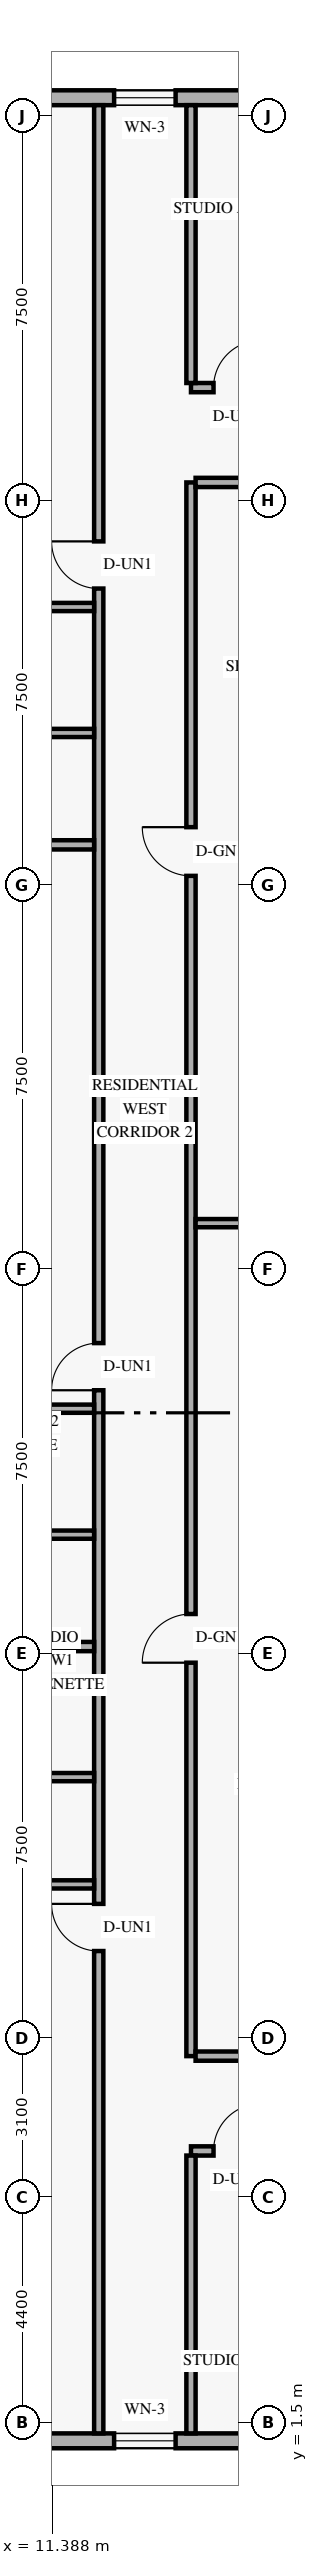
"""IFC4 building model, lengths in metres.
Left out: names, types, materials, properties, quantities, classifications, styles, units other than length and angle.
Written with IfcOpenShell. Run it as: python <this file> out.ifc"""

import sys

from ifc_helpers import new_model, si_unit, direction, frame, frame_2d, origin, place, context, subcontext, project, spatial, rectangle, extrude, element, fill, save


model = new_model("IFC4")
c1 = context("Model", 3, precision=1e-05, world=origin(), true_north=direction((0.0, 1.0)))
c2 = subcontext(c1, "Body", "Model", "MODEL_VIEW")
j1 = project(units=[si_unit("LENGTHUNIT", "METRE"), si_unit("PLANEANGLEUNIT", "RADIAN")], contexts=[c1])
p1 = place(None, origin())
s1 = spatial("IfcSite", under=j1, at=p1, CompositionType="ELEMENT")
p2 = place(p1, origin())
s2 = spatial("IfcBuilding", under=s1, at=p2, CompositionType="ELEMENT")
p3 = place(p2, frame((0.0, 0.0, 67.8)))
s3 = spatial("IfcBuildingStorey", under=s2, at=p3, CompositionType="ELEMENT", Elevation=67.8)
p4 = place(p3, frame((5.42, 1.145, 0.0), z_axis=(0.0, 0.0, 1.0), x_axis=(1.0, 0.0, 0.0)))
e1 = element("IfcWall", 1, at=p4, inside=s3, PredefinedType="SOLIDWALL", context=c2, shape_type="SweptSolid", body=[
    extrude(rectangle(XDim=39.56, YDim=0.29, at=frame_2d((19.78, 0.0))), origin(), (0.0, 0.0, 1.0), 3.3),
])
p5 = place(p4, frame((2.765, 0.0, 0.85)))
e2 = element("IfcOpeningElement", 2, at=p5, cuts=e1, PredefinedType="OPENING", context=c2, shape_type="SweptSolid", body=[
    extrude(rectangle(XDim=1.35, YDim=1.55, at=frame_2d((0.675, 0.775))), frame((0.0, 0.155, 0.0), z_axis=(0.0, -1.0, 0.0), x_axis=(1.0, 0.0, 0.0)), (0.0, 0.0, 1.0), 0.31),
])
p6 = place(p4, frame((7.18, 0.0, 0.85)))
e3 = element("IfcOpeningElement", 3, at=p6, cuts=e1, PredefinedType="OPENING", context=c2, shape_type="SweptSolid", body=[
    extrude(rectangle(XDim=1.2, YDim=1.5, at=frame_2d((0.6, 0.75))), frame((0.0, 0.155, 0.0), z_axis=(0.0, -1.0, 0.0), x_axis=(1.0, 0.0, 0.0)), (0.0, 0.0, 1.0), 0.31),
])
p7 = place(p4, frame((12.056, 0.0, 0.85)))
e4 = element("IfcOpeningElement", 4, at=p7, cuts=e1, PredefinedType="OPENING", context=c2, shape_type="SweptSolid", body=[
    extrude(rectangle(XDim=1.35, YDim=1.55, at=frame_2d((0.675, 0.775))), frame((0.0, 0.155, 0.0), z_axis=(0.0, -1.0, 0.0), x_axis=(1.0, 0.0, 0.0)), (0.0, 0.0, 1.0), 0.31),
])
p8 = place(p4, frame((18.665, 0.0, 0.85)))
e5 = element("IfcOpeningElement", 5, at=p8, cuts=e1, PredefinedType="OPENING", context=c2, shape_type="SweptSolid", body=[
    extrude(rectangle(XDim=1.35, YDim=1.55, at=frame_2d((0.675, 0.775))), frame((0.0, 0.155, 0.0), z_axis=(0.0, -1.0, 0.0), x_axis=(1.0, 0.0, 0.0)), (0.0, 0.0, 1.0), 0.31),
])
p9 = place(p4, frame((25.274, 0.0, 0.85)))
e6 = element("IfcOpeningElement", 6, at=p9, cuts=e1, PredefinedType="OPENING", context=c2, shape_type="SweptSolid", body=[
    extrude(rectangle(XDim=1.35, YDim=1.55, at=frame_2d((0.675, 0.775))), frame((0.0, 0.155, 0.0), z_axis=(0.0, -1.0, 0.0), x_axis=(1.0, 0.0, 0.0)), (0.0, 0.0, 1.0), 0.31),
])
p10 = place(p4, frame((30.39, 0.0, 0.85)))
e7 = element("IfcOpeningElement", 7, at=p10, cuts=e1, PredefinedType="OPENING", context=c2, shape_type="SweptSolid", body=[
    extrude(rectangle(XDim=1.35, YDim=1.55, at=frame_2d((0.675, 0.775))), frame((0.0, 0.155, 0.0), z_axis=(0.0, -1.0, 0.0), x_axis=(1.0, 0.0, 0.0)), (0.0, 0.0, 1.0), 0.31),
])
p11 = place(p4, frame((35.17, 0.0, 0.85)))
e8 = element("IfcOpeningElement", 8, at=p11, cuts=e1, PredefinedType="OPENING", context=c2, shape_type="SweptSolid", body=[
    extrude(rectangle(XDim=1.35, YDim=1.55, at=frame_2d((0.675, 0.775))), frame((0.0, 0.155, 0.0), z_axis=(0.0, -1.0, 0.0), x_axis=(1.0, 0.0, 0.0)), (0.0, 0.0, 1.0), 0.31),
])
p12 = place(p3, frame((44.98, 46.855, 0.0), z_axis=(0.0, 0.0, 1.0), x_axis=(-1.0, 0.0, 0.0)))
e9 = element("IfcWall", 9, at=p12, inside=s3, PredefinedType="SOLIDWALL", context=c2, shape_type="SweptSolid", body=[
    extrude(rectangle(XDim=39.56, YDim=0.29, at=frame_2d((19.78, 0.0))), origin(), (0.0, 0.0, 1.0), 3.3),
])
p13 = place(p12, frame((35.445, 0.0, 0.85)))
e10 = element("IfcOpeningElement", 10, at=p13, cuts=e9, PredefinedType="OPENING", context=c2, shape_type="SweptSolid", body=[
    extrude(rectangle(XDim=1.35, YDim=1.55, at=frame_2d((0.675, 0.775))), frame((0.0, 0.155, 0.0), z_axis=(0.0, -1.0, 0.0), x_axis=(1.0, 0.0, 0.0)), (0.0, 0.0, 1.0), 0.31),
])
p14 = place(p12, frame((31.18, 0.0, 0.85)))
e11 = element("IfcOpeningElement", 11, at=p14, cuts=e9, PredefinedType="OPENING", context=c2, shape_type="SweptSolid", body=[
    extrude(rectangle(XDim=1.2, YDim=1.5, at=frame_2d((0.6, 0.75))), frame((0.0, 0.155, 0.0), z_axis=(0.0, -1.0, 0.0), x_axis=(1.0, 0.0, 0.0)), (0.0, 0.0, 1.0), 0.31),
])
p15 = place(p12, frame((25.834, 0.0, 0.85)))
e12 = element("IfcOpeningElement", 12, at=p15, cuts=e9, PredefinedType="OPENING", context=c2, shape_type="SweptSolid", body=[
    extrude(rectangle(XDim=1.35, YDim=1.55, at=frame_2d((0.675, 0.775))), frame((0.0, 0.155, 0.0), z_axis=(0.0, -1.0, 0.0), x_axis=(1.0, 0.0, 0.0)), (0.0, 0.0, 1.0), 0.31),
])
p16 = place(p12, frame((18.799, 0.0, 0.85)))
e13 = element("IfcOpeningElement", 13, at=p16, cuts=e9, PredefinedType="OPENING", context=c2, shape_type="SweptSolid", body=[
    extrude(rectangle(XDim=1.35, YDim=1.55, at=frame_2d((0.675, 0.775))), frame((0.0, 0.155, 0.0), z_axis=(0.0, -1.0, 0.0), x_axis=(1.0, 0.0, 0.0)), (0.0, 0.0, 1.0), 0.31),
])
p17 = place(p12, frame((12.51, 0.0, 0.85)))
e14 = element("IfcOpeningElement", 14, at=p17, cuts=e9, PredefinedType="OPENING", context=c2, shape_type="SweptSolid", body=[
    extrude(rectangle(XDim=1.35, YDim=1.55, at=frame_2d((0.675, 0.775))), frame((0.0, 0.155, 0.0), z_axis=(0.0, -1.0, 0.0), x_axis=(1.0, 0.0, 0.0)), (0.0, 0.0, 1.0), 0.31),
])
p18 = place(p12, frame((7.82, 0.0, 0.85)))
e15 = element("IfcOpeningElement", 15, at=p18, cuts=e9, PredefinedType="OPENING", context=c2, shape_type="SweptSolid", body=[
    extrude(rectangle(XDim=1.35, YDim=1.55, at=frame_2d((0.675, 0.775))), frame((0.0, 0.155, 0.0), z_axis=(0.0, -1.0, 0.0), x_axis=(1.0, 0.0, 0.0)), (0.0, 0.0, 1.0), 0.31),
])
p19 = place(p12, frame((3.04, 0.0, 0.85)))
e16 = element("IfcOpeningElement", 16, at=p19, cuts=e9, PredefinedType="OPENING", context=c2, shape_type="SweptSolid", body=[
    extrude(rectangle(XDim=1.35, YDim=1.55, at=frame_2d((0.675, 0.775))), frame((0.0, 0.155, 0.0), z_axis=(0.0, -1.0, 0.0), x_axis=(1.0, 0.0, 0.0)), (0.0, 0.0, 1.0), 0.31),
])
p20 = place(p3, frame((14.1, 6.8, 0.0), z_axis=(0.0, 0.0, 1.0), x_axis=(1.0, 0.0, 0.0)))
e17 = element("IfcWall", 17, at=p20, inside=s3, PredefinedType="STANDARD", context=c2, shape_type="SweptSolid", body=[
    extrude(rectangle(XDim=21.32, YDim=0.18, at=frame_2d((10.66, 0.0))), origin(), (0.0, 0.0, 1.0), 2.589),
])
p21 = place(p20, frame((0.44, 0.0, 0.0)))
e18 = element("IfcOpeningElement", 18, at=p21, cuts=e17, PredefinedType="OPENING", context=c2, shape_type="SweptSolid", body=[
    extrude(rectangle(XDim=0.92, YDim=2.15, at=frame_2d((0.46, 1.075))), frame((0.0, 0.1, 0.0), z_axis=(0.0, -1.0, 0.0), x_axis=(1.0, 0.0, 0.0)), (0.0, 0.0, 1.0), 0.2),
])
p22 = place(p20, frame((8.582, 0.0, 0.0)))
e19 = element("IfcOpeningElement", 19, at=p22, cuts=e17, PredefinedType="OPENING", context=c2, shape_type="SweptSolid", body=[
    extrude(rectangle(XDim=0.95, YDim=2.15, at=frame_2d((0.475, 1.075))), frame((0.0, 0.1, 0.0), z_axis=(0.0, -1.0, 0.0), x_axis=(1.0, 0.0, 0.0)), (0.0, 0.0, 1.0), 0.2),
])
p23 = place(p20, frame((13.658, 0.0, 0.0)))
e20 = element("IfcOpeningElement", 20, at=p23, cuts=e17, PredefinedType="OPENING", context=c2, shape_type="SweptSolid", body=[
    extrude(rectangle(XDim=0.92, YDim=2.15, at=frame_2d((0.46, 1.075))), frame((0.0, 0.1, 0.0), z_axis=(0.0, -1.0, 0.0), x_axis=(1.0, 0.0, 0.0)), (0.0, 0.0, 1.0), 0.2),
])
p24 = place(p3, frame((14.1, 41.2, 0.0), z_axis=(0.0, 0.0, 1.0), x_axis=(1.0, 0.0, 0.0)))
e21 = element("IfcWall", 21, at=p24, inside=s3, PredefinedType="STANDARD", context=c2, shape_type="SweptSolid", body=[
    extrude(rectangle(XDim=21.32, YDim=0.18, at=frame_2d((10.66, 0.0))), origin(), (0.0, 0.0, 1.0), 2.589),
])
p25 = place(p24, frame((0.44, 0.0, 0.0)))
e22 = element("IfcOpeningElement", 22, at=p25, cuts=e21, PredefinedType="OPENING", context=c2, shape_type="SweptSolid", body=[
    extrude(rectangle(XDim=0.92, YDim=2.15, at=frame_2d((0.46, 1.075))), frame((0.0, 0.1, 0.0), z_axis=(0.0, -1.0, 0.0), x_axis=(1.0, 0.0, 0.0)), (0.0, 0.0, 1.0), 0.2),
])
p26 = place(p24, frame((10.631, 0.0, 0.0)))
e23 = element("IfcOpeningElement", 23, at=p26, cuts=e21, PredefinedType="OPENING", context=c2, shape_type="SweptSolid", body=[
    extrude(rectangle(XDim=0.95, YDim=2.15, at=frame_2d((0.475, 1.075))), frame((0.0, 0.1, 0.0), z_axis=(0.0, -1.0, 0.0), x_axis=(1.0, 0.0, 0.0)), (0.0, 0.0, 1.0), 0.2),
])
p27 = place(p24, frame((14.511, 0.0, 0.0)))
e24 = element("IfcOpeningElement", 24, at=p27, cuts=e21, PredefinedType="OPENING", context=c2, shape_type="SweptSolid", body=[
    extrude(rectangle(XDim=0.92, YDim=2.15, at=frame_2d((0.46, 1.075))), frame((0.0, 0.1, 0.0), z_axis=(0.0, -1.0, 0.0), x_axis=(1.0, 0.0, 0.0)), (0.0, 0.0, 1.0), 0.2),
])
p28 = place(p3, frame((12.3, 1.29, 0.0), z_axis=(0.0, 0.0, 1.0), x_axis=(0.0, 1.0, 0.0)))
e25 = element("IfcWall", 25, at=p28, inside=s3, PredefinedType="STANDARD", context=c2, shape_type="SweptSolid", body=[
    extrude(rectangle(XDim=45.42, YDim=0.18, at=frame_2d((22.71, 0.0))), origin(), (0.0, 0.0, 1.0), 2.589),
])
p29 = place(p28, frame((9.41, 0.0, 0.0)))
e26 = element("IfcOpeningElement", 26, at=p29, cuts=e25, PredefinedType="OPENING", context=c2, shape_type="SweptSolid", body=[
    extrude(rectangle(XDim=0.92, YDim=2.15, at=frame_2d((0.46, 1.075))), frame((0.0, 0.1, 0.0), z_axis=(0.0, -1.0, 0.0), x_axis=(1.0, 0.0, 0.0)), (0.0, 0.0, 1.0), 0.2),
])
p30 = place(p28, frame((20.35, 0.0, 0.0)))
e27 = element("IfcOpeningElement", 27, at=p30, cuts=e25, PredefinedType="OPENING", context=c2, shape_type="SweptSolid", body=[
    extrude(rectangle(XDim=0.92, YDim=2.15, at=frame_2d((0.46, 1.075))), frame((0.0, 0.1, 0.0), z_axis=(0.0, -1.0, 0.0), x_axis=(1.0, 0.0, 0.0)), (0.0, 0.0, 1.0), 0.2),
])
p31 = place(p28, frame((35.99, 0.0, 0.0)))
e28 = element("IfcOpeningElement", 28, at=p31, cuts=e25, PredefinedType="OPENING", context=c2, shape_type="SweptSolid", body=[
    extrude(rectangle(XDim=0.92, YDim=2.15, at=frame_2d((0.46, 1.075))), frame((0.0, 0.1, 0.0), z_axis=(0.0, -1.0, 0.0), x_axis=(1.0, 0.0, 0.0)), (0.0, 0.0, 1.0), 0.2),
])
p32 = place(p3, frame((14.1, 8.65, 0.0), z_axis=(0.0, 0.0, 1.0), x_axis=(0.0, 1.0, 0.0)))
e29 = element("IfcWall", 29, at=p32, inside=s3, PredefinedType="STANDARD", context=c2, shape_type="SweptSolid", body=[
    extrude(rectangle(XDim=30.7, YDim=0.18, at=frame_2d((15.35, 0.0))), origin(), (0.0, 0.0, 1.0), 2.589),
])
p33 = place(p32, frame((7.675, 0.0, 0.0)))
e30 = element("IfcOpeningElement", 30, at=p33, cuts=e29, PredefinedType="OPENING", context=c2, shape_type="SweptSolid", body=[
    extrude(rectangle(XDim=0.95, YDim=2.15, at=frame_2d((0.475, 1.075))), frame((0.0, 0.1, 0.0), z_axis=(0.0, -1.0, 0.0), x_axis=(1.0, 0.0, 0.0)), (0.0, 0.0, 1.0), 0.2),
])
p34 = place(p32, frame((23.025, 0.0, 0.0)))
e31 = element("IfcOpeningElement", 31, at=p34, cuts=e29, PredefinedType="OPENING", context=c2, shape_type="SweptSolid", body=[
    extrude(rectangle(XDim=0.95, YDim=2.15, at=frame_2d((0.475, 1.075))), frame((0.0, 0.1, 0.0), z_axis=(0.0, -1.0, 0.0), x_axis=(1.0, 0.0, 0.0)), (0.0, 0.0, 1.0), 0.2),
])
for number, where, z_axis, x_axis in (
    (32, (14.19, 8.65, 0.0), (0.0, 0.0, 1.0), (1.0, 0.0, 0.0)),
    (33, (14.19, 39.35, 0.0), (0.0, 0.0, 1.0), (1.0, 0.0, 0.0)),
):
    element("IfcWall", number, at=place(p3, frame(where, z_axis=z_axis, x_axis=x_axis)), inside=s3, PredefinedType="STANDARD", context=c2, shape_type="SweptSolid", body=[
        extrude(rectangle(XDim=7.37, YDim=0.18, at=frame_2d((3.685, 0.0))), origin(), (0.0, 0.0, 1.0), 2.589),
    ])
for number, where, z_axis, x_axis in (
    (34, (14.1, 1.29, 0.0), (0.0, 0.0, 1.0), (0.0, 1.0, 0.0)),
    (35, (14.1, 41.29, 0.0), (0.0, 0.0, 1.0), (0.0, 1.0, 0.0)),
):
    element("IfcWall", number, at=place(p3, frame(where, z_axis=z_axis, x_axis=x_axis)), inside=s3, PredefinedType="PARTITIONING", context=c2, shape_type="SweptSolid", body=[
        extrude(rectangle(XDim=5.42, YDim=0.18, at=frame_2d((2.71, 0.0))), origin(), (0.0, 0.0, 1.0), 2.749),
    ])
p35 = place(p3, frame((9.68, 12.0, 0.0), z_axis=(0.0, 0.0, 1.0), x_axis=(1.0, 0.0, 0.0)))
e36 = element("IfcWall", 36, at=p35, inside=s3, PredefinedType="PLUMBINGWALL", context=c2, shape_type="SweptSolid", body=[
    extrude(rectangle(XDim=2.53, YDim=0.16, at=frame_2d((1.265, 0.0))), origin(), (0.0, 0.0, 1.0), 2.589),
])
p36 = place(p3, frame((9.84, 14.093, 0.0), z_axis=(0.0, 0.0, 1.0), x_axis=(1.0, 0.0, 0.0)))
e37 = element("IfcWall", 37, at=p36, inside=s3, PredefinedType="PLUMBINGWALL", context=c2, shape_type="SweptSolid", body=[
    extrude(rectangle(XDim=2.37, YDim=0.16, at=frame_2d((1.185, 0.0))), origin(), (0.0, 0.0, 1.0), 2.589),
])
p37 = place(p3, frame((2.09, 16.64, 0.0), z_axis=(0.0, 0.0, 1.0), x_axis=(1.0, 0.0, 0.0)))
e38 = element("IfcWall", 38, at=p37, inside=s3, PredefinedType="PARTITIONING", context=c2, shape_type="SweptSolid", body=[
    extrude(rectangle(XDim=10.12, YDim=0.18, at=frame_2d((5.06, 0.0))), origin(), (0.0, 0.0, 1.0), 2.589),
])
p38 = place(p3, frame((8.43, 21.28, 0.0), z_axis=(0.0, 0.0, 1.0), x_axis=(1.0, 0.0, 0.0)))
e39 = element("IfcWall", 39, at=p38, inside=s3, PredefinedType="PLUMBINGWALL", context=c2, shape_type="SweptSolid", body=[
    extrude(rectangle(XDim=3.78, YDim=0.16, at=frame_2d((1.89, 0.0))), origin(), (0.0, 0.0, 1.0), 2.589),
])
p39 = place(p3, frame((8.59, 18.823, 0.0), z_axis=(0.0, 0.0, 1.0), x_axis=(1.0, 0.0, 0.0)))
e40 = element("IfcWall", 40, at=p39, inside=s3, PredefinedType="PLUMBINGWALL", context=c2, shape_type="SweptSolid", body=[
    extrude(rectangle(XDim=3.62, YDim=0.16, at=frame_2d((1.81, 0.0))), origin(), (0.0, 0.0, 1.0), 2.589),
])
p40 = place(p3, frame((2.09, 32.28, 0.0), z_axis=(0.0, 0.0, 1.0), x_axis=(1.0, 0.0, 0.0)))
e41 = element("IfcWall", 41, at=p40, inside=s3, PredefinedType="PARTITIONING", context=c2, shape_type="SweptSolid", body=[
    extrude(rectangle(XDim=10.12, YDim=0.18, at=frame_2d((5.06, 0.0))), origin(), (0.0, 0.0, 1.0), 2.589),
])
p41 = place(p3, frame((9.528, 36.92, 0.0), z_axis=(0.0, 0.0, 1.0), x_axis=(1.0, 0.0, 0.0)))
e42 = element("IfcWall", 42, at=p41, inside=s3, PredefinedType="PLUMBINGWALL", context=c2, shape_type="SweptSolid", body=[
    extrude(rectangle(XDim=2.682, YDim=0.16, at=frame_2d((1.341, 0.0))), origin(), (0.0, 0.0, 1.0), 2.589),
])
p42 = place(p3, frame((9.688, 34.463, 0.0), z_axis=(0.0, 0.0, 1.0), x_axis=(1.0, 0.0, 0.0)))
e43 = element("IfcWall", 43, at=p42, inside=s3, PredefinedType="PLUMBINGWALL", context=c2, shape_type="SweptSolid", body=[
    extrude(rectangle(XDim=2.522, YDim=0.16, at=frame_2d((1.261, 0.0))), origin(), (0.0, 0.0, 1.0), 2.589),
])
p43 = place(p3, frame((14.19, 24.9, 0.0), z_axis=(0.0, 0.0, 1.0), x_axis=(1.0, 0.0, 0.0)))
e44 = element("IfcWall", 44, at=p43, inside=s3, PredefinedType="PARTITIONING", context=c2, shape_type="SweptSolid", body=[
    extrude(rectangle(XDim=7.37, YDim=0.16, at=frame_2d((3.685, 0.0))), origin(), (0.0, 0.0, 1.0), 2.589),
])
p44 = place(p6, origin())
e45 = element("IfcWindow", 45, at=p44, inside=s3, PartitioningType="SINGLE_PANEL", PredefinedType="WINDOW", context=c2, shape_type="SweptSolid", body=[
    extrude(rectangle(XDim=1.2, YDim=1.5, at=frame_2d((0.6, 0.75))), frame((0.0, 0.03, 0.0), z_axis=(0.0, -1.0, 0.0), x_axis=(1.0, 0.0, 0.0)), (0.0, 0.0, 1.0), 0.06),
])
fill(e3, e45)
p45 = place(p14, origin())
e46 = element("IfcWindow", 46, at=p45, inside=s3, PartitioningType="SINGLE_PANEL", PredefinedType="WINDOW", context=c2, shape_type="SweptSolid", body=[
    extrude(rectangle(XDim=1.2, YDim=1.5, at=frame_2d((0.6, 0.75))), frame((0.0, 0.03, 0.0), z_axis=(0.0, -1.0, 0.0), x_axis=(1.0, 0.0, 0.0)), (0.0, 0.0, 1.0), 0.06),
])
fill(e11, e46)
p46 = place(p29, origin())
e47 = element("IfcDoor", 47, at=p46, inside=s3, OperationType="SINGLE_SWING_RIGHT", PredefinedType="DOOR", context=c2, shape_type="SweptSolid", body=[
    extrude(rectangle(XDim=0.92, YDim=2.15, at=frame_2d((0.46, 1.075))), frame((0.0, 0.025, 0.0), z_axis=(0.0, -1.0, 0.0), x_axis=(1.0, 0.0, 0.0)), (0.0, 0.0, 1.0), 0.05),
])
fill(e26, e47)
p47 = place(p30, origin())
e48 = element("IfcDoor", 48, at=p47, inside=s3, OperationType="SINGLE_SWING_LEFT", PredefinedType="DOOR", context=c2, shape_type="SweptSolid", body=[
    extrude(rectangle(XDim=0.92, YDim=2.15, at=frame_2d((0.46, 1.075))), frame((0.0, 0.025, 0.0), z_axis=(0.0, -1.0, 0.0), x_axis=(1.0, 0.0, 0.0)), (0.0, 0.0, 1.0), 0.05),
])
fill(e27, e48)
p48 = place(p31, origin())
e49 = element("IfcDoor", 49, at=p48, inside=s3, OperationType="SINGLE_SWING_RIGHT", PredefinedType="DOOR", context=c2, shape_type="SweptSolid", body=[
    extrude(rectangle(XDim=0.92, YDim=2.15, at=frame_2d((0.46, 1.075))), frame((0.0, 0.025, 0.0), z_axis=(0.0, -1.0, 0.0), x_axis=(1.0, 0.0, 0.0)), (0.0, 0.0, 1.0), 0.05),
])
fill(e28, e49)
p49 = place(p33, origin())
e50 = element("IfcDoor", 50, at=p49, inside=s3, OperationType="SINGLE_SWING_LEFT", PredefinedType="DOOR", context=c2, shape_type="SweptSolid", body=[
    extrude(rectangle(XDim=0.95, YDim=2.15, at=frame_2d((0.475, 1.075))), frame((0.0, 0.025, 0.0), z_axis=(0.0, -1.0, 0.0), x_axis=(1.0, 0.0, 0.0)), (0.0, 0.0, 1.0), 0.05),
])
fill(e30, e50)
p50 = place(p34, origin())
e51 = element("IfcDoor", 51, at=p50, inside=s3, OperationType="SINGLE_SWING_RIGHT", PredefinedType="DOOR", context=c2, shape_type="SweptSolid", body=[
    extrude(rectangle(XDim=0.95, YDim=2.15, at=frame_2d((0.475, 1.075))), frame((0.0, 0.025, 0.0), z_axis=(0.0, -1.0, 0.0), x_axis=(1.0, 0.0, 0.0)), (0.0, 0.0, 1.0), 0.05),
])
fill(e31, e51)
p51 = place(p21, origin())
e52 = element("IfcDoor", 52, at=p51, inside=s3, OperationType="SINGLE_SWING_RIGHT", PredefinedType="DOOR", context=c2, shape_type="SweptSolid", body=[
    extrude(rectangle(XDim=0.92, YDim=2.15, at=frame_2d((0.46, 1.075))), frame((0.0, 0.025, 0.0), z_axis=(0.0, -1.0, 0.0), x_axis=(1.0, 0.0, 0.0)), (0.0, 0.0, 1.0), 0.05),
])
fill(e18, e52)
p52 = place(p25, origin())
e53 = element("IfcDoor", 53, at=p52, inside=s3, OperationType="SINGLE_SWING_RIGHT", PredefinedType="DOOR", context=c2, shape_type="SweptSolid", body=[
    extrude(rectangle(XDim=0.92, YDim=2.15, at=frame_2d((0.46, 1.075))), frame((0.0, 0.025, 0.0), z_axis=(0.0, -1.0, 0.0), x_axis=(1.0, 0.0, 0.0)), (0.0, 0.0, 1.0), 0.05),
])
fill(e22, e53)
save(model, sys.argv[1])
